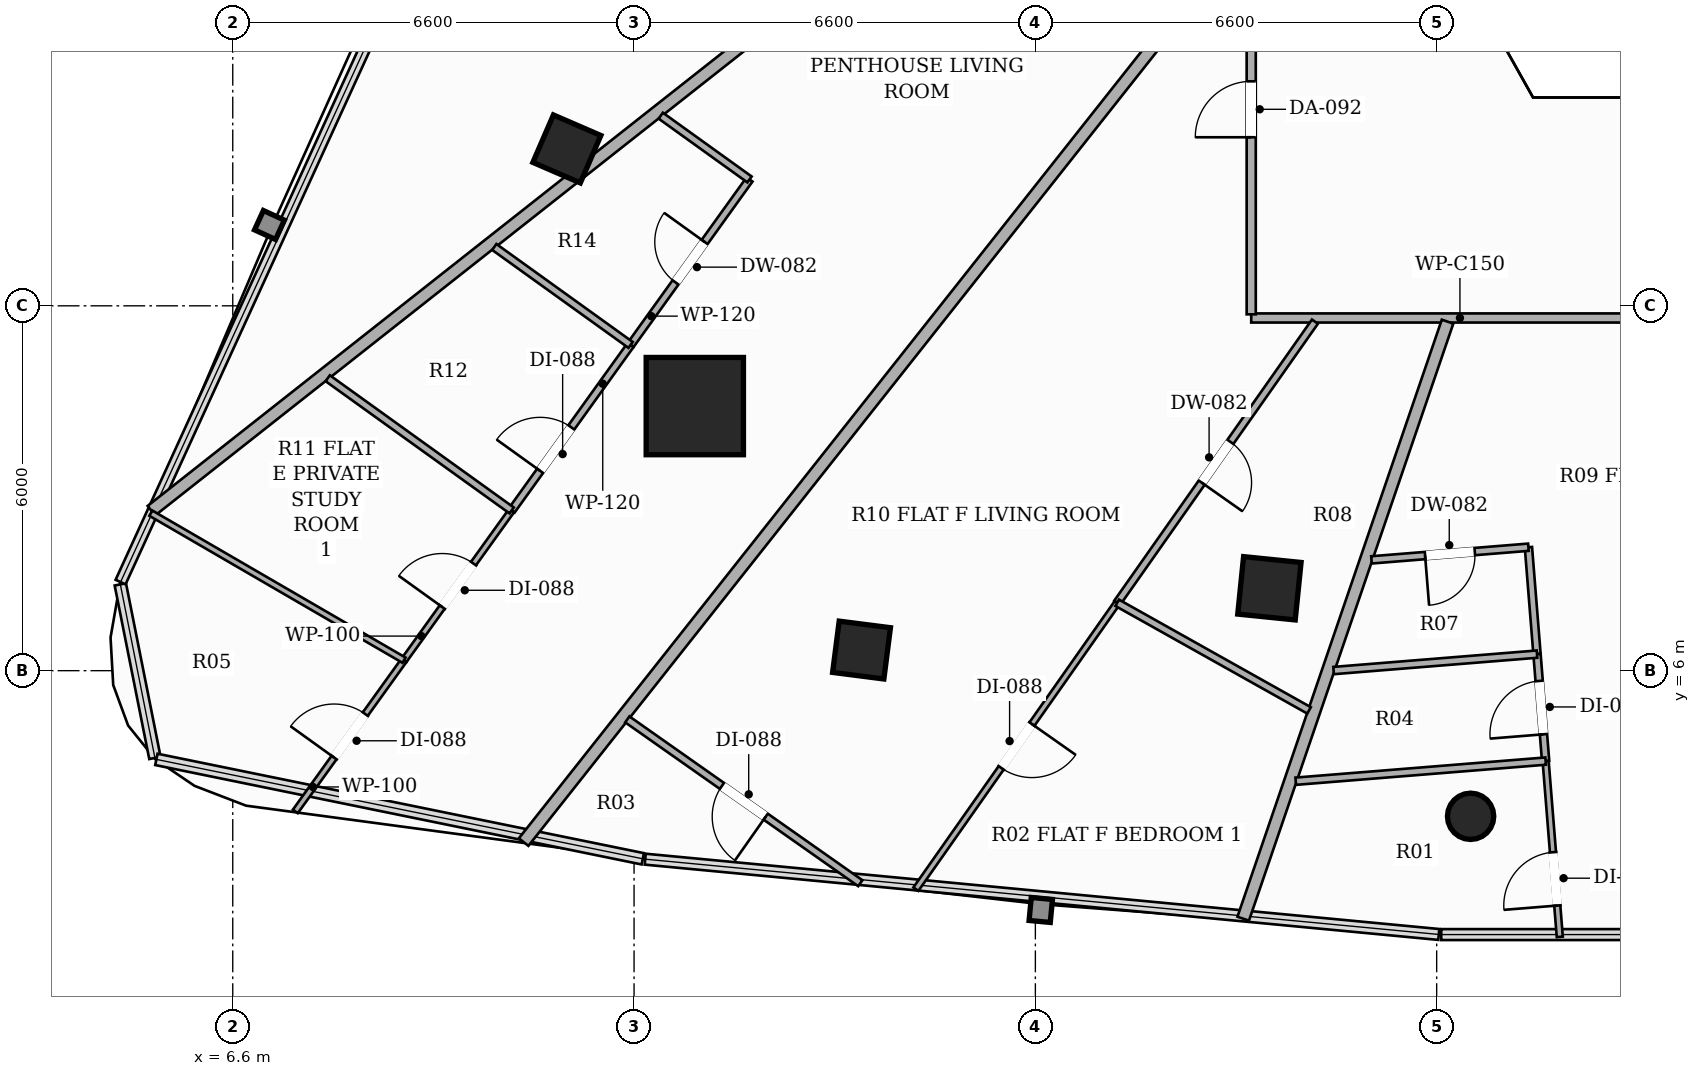
"""IFC4 building model, lengths in metres.
Left out: names, types, materials, properties, quantities, classifications, styles, units other than length and angle.
Written with IfcOpenShell. Run it as: python <this file> out.ifc"""

import sys

from ifc_helpers import new_model, si_unit, direction, frame, frame_2d, origin, origin_2d, place, context, subcontext, project, spatial, rectangle, hollow_rectangle, hollow_circle, extrude, element, fill, save


model = new_model("IFC4")
c1 = context("Model", 3, precision=1e-05, world=origin(), true_north=direction((0.0, 1.0)))
c2 = subcontext(c1, "Body", "Model", "MODEL_VIEW")
j1 = project(units=[si_unit("LENGTHUNIT", "METRE"), si_unit("PLANEANGLEUNIT", "RADIAN")], contexts=[c1])
p1 = place(None, origin())
s1 = spatial("IfcSite", under=j1, at=p1, CompositionType="ELEMENT")
p2 = place(p1, origin())
s2 = spatial("IfcBuilding", under=s1, at=p2, CompositionType="ELEMENT")
p3 = place(p2, frame((0.0, 0.0, 53.3)))
s3 = spatial("IfcBuildingStorey", under=s2, at=p3, CompositionType="ELEMENT", Elevation=53.3)
p4 = place(p3, frame((14.199, 10.351, 0.0), z_axis=(0.0, 0.0, 1.0), x_axis=(1.0, 0.0, 0.0)))
e1 = element("IfcColumn", 1, at=p4, inside=s3, PredefinedType="COLUMN", context=c2, shape_type="SweptSolid", body=[
    extrude(hollow_rectangle(XDim=1.6, YDim=1.6, WallThickness=0.05, at=origin_2d()), origin(), (0.0, 0.0, 1.0), 3.3),
])
p5 = place(p3, frame((23.649, 7.355, 0.0), z_axis=(0.0, 0.0, 1.0), x_axis=(-0.994880708829, 0.101056297183, 0.0)))
e2 = element("IfcColumn", 2, at=p5, inside=s3, PredefinedType="COLUMN", context=c2, shape_type="SweptSolid", body=[
    extrude(hollow_rectangle(XDim=0.95, YDim=0.95, WallThickness=0.032, at=origin_2d()), origin(), (0.0, 0.0, 1.0), 3.3),
])
for number, where, z_axis, x_axis in (
    (3, (12.095, 14.58, 0.0), (0.0, 0.0, 1.0), (0.397, 0.918, 0.0)),
    (4, (16.941, 6.339, 0.0), (0.0, 0.0, 1.0), (-0.992, 0.127, 0.0)),
):
    element("IfcColumn", number, at=place(p3, frame(where, z_axis=z_axis, x_axis=x_axis)), inside=s3, PredefinedType="COLUMN", context=c2, shape_type="SweptSolid", body=[
        extrude(hollow_rectangle(XDim=0.85, YDim=0.85, WallThickness=0.028, at=origin_2d()), origin(), (0.0, 0.0, 1.0), 3.3),
    ])
p6 = place(p3, frame((26.958, 3.605, 0.0), z_axis=(0.0, 0.0, 1.0), x_axis=(1.0, 0.0, 0.0)))
e5 = element("IfcColumn", 5, at=p6, inside=s3, PredefinedType="COLUMN", context=c2, shape_type="SweptSolid", body=[
    extrude(hollow_circle(Radius=0.381, WallThickness=0.022, at=origin_2d()), origin(), (0.0, 0.0, 1.0), 3.3),
])
p7 = place(p3, frame((42.59, 11.8, 0.0), z_axis=(0.0, 0.0, 1.0), x_axis=(-1.0, 0.0, 0.0)))
e6 = element("IfcWall", 6, at=p7, inside=s3, PredefinedType="PARTITIONING", context=c2, shape_type="SweptSolid", body=[
    extrude(rectangle(XDim=19.24, YDim=0.15, at=frame_2d((9.62, 0.0))), origin(), (0.0, 0.0, 1.0), 2.669),
])
p8 = place(p7, frame((11.355, 0.0, 0.0)))
e7 = element("IfcOpeningElement", 7, at=p8, cuts=e6, PredefinedType="OPENING", context=c2, shape_type="SweptSolid", body=[
    extrude(rectangle(XDim=0.92, YDim=2.15, at=frame_2d((0.46, 1.075))), frame((0.0, 0.085, 0.0), z_axis=(0.0, -1.0, 0.0), x_axis=(1.0, 0.0, 0.0)), (0.0, 0.0, 1.0), 0.17),
])
p9 = place(p7, frame((3.524, 0.0, 0.0)))
e8 = element("IfcOpeningElement", 8, at=p9, cuts=e6, PredefinedType="OPENING", context=c2, shape_type="SweptSolid", body=[
    extrude(rectangle(XDim=0.88, YDim=2.1, at=frame_2d((0.44, 1.05))), frame((0.0, 0.085, 0.0), z_axis=(0.0, -1.0, 0.0), x_axis=(1.0, 0.0, 0.0)), (0.0, 0.0, 1.0), 0.17),
])
p10 = place(p3, frame((23.35, 11.86, 0.0), z_axis=(0.0, 0.0, 1.0), x_axis=(0.0, 1.0, 0.0)))
e9 = element("IfcWall", 9, at=p10, inside=s3, PredefinedType="PARTITIONING", context=c2, shape_type="SweptSolid", body=[
    extrude(rectangle(XDim=25.04, YDim=0.15, at=frame_2d((12.52, 0.0))), origin(), (0.0, 0.0, 1.0), 2.413),
])
p11 = place(p10, frame((15.434, 0.0, 0.0)))
e10 = element("IfcOpeningElement", 10, at=p11, cuts=e9, PredefinedType="OPENING", context=c2, shape_type="SweptSolid", body=[
    extrude(rectangle(XDim=0.88, YDim=2.1, at=frame_2d((0.44, 1.05))), frame((0.0, 0.085, 0.0), z_axis=(0.0, -1.0, 0.0), x_axis=(1.0, 0.0, 0.0)), (0.0, 0.0, 1.0), 0.17),
])
p12 = place(p10, frame((22.315, 0.0, 0.0)))
e11 = element("IfcOpeningElement", 11, at=p12, cuts=e9, PredefinedType="OPENING", context=c2, shape_type="SweptSolid", body=[
    extrude(rectangle(XDim=0.88, YDim=2.1, at=frame_2d((0.44, 1.05))), frame((0.0, 0.085, 0.0), z_axis=(0.0, -1.0, 0.0), x_axis=(1.0, 0.0, 0.0)), (0.0, 0.0, 1.0), 0.17),
])
p13 = place(p10, frame((8.21, 0.0, 0.0)))
e12 = element("IfcOpeningElement", 12, at=p13, cuts=e9, PredefinedType="OPENING", context=c2, shape_type="SweptSolid", body=[
    extrude(rectangle(XDim=0.92, YDim=2.15, at=frame_2d((0.46, 1.075))), frame((0.0, 0.085, 0.0), z_axis=(0.0, -1.0, 0.0), x_axis=(1.0, 0.0, 0.0)), (0.0, 0.0, 1.0), 0.17),
])
p14 = place(p10, frame((2.912, 0.0, 0.0)))
e13 = element("IfcOpeningElement", 13, at=p14, cuts=e9, PredefinedType="OPENING", context=c2, shape_type="SweptSolid", body=[
    extrude(rectangle(XDim=0.92, YDim=2.15, at=frame_2d((0.46, 1.075))), frame((0.0, 0.085, 0.0), z_axis=(0.0, -1.0, 0.0), x_axis=(1.0, 0.0, 0.0)), (0.0, 0.0, 1.0), 0.17),
])
p15 = place(p3, frame((23.29, 22.844, 0.0), z_axis=(0.0, 0.0, 1.0), x_axis=(-0.785302077685, -0.619112790034, 0.0)))
e14 = element("IfcWall", 14, at=p15, inside=s3, PredefinedType="PARTITIONING", context=c2, shape_type="SweptSolid", body=[
    extrude(rectangle(XDim=22.957, YDim=0.2, at=frame_2d((11.479, 0.0))), origin(), (0.0, 0.0, 1.0), 2.413),
])
p16 = place(p3, frame((23.29, 18.228, 0.0), z_axis=(0.0, 0.0, 1.0), x_axis=(-0.620501189922, -0.784205504511, 0.0)))
e15 = element("IfcWall", 15, at=p16, inside=s3, PredefinedType="PARTITIONING", context=c2, shape_type="SweptSolid", body=[
    extrude(rectangle(XDim=19.188, YDim=0.2, at=frame_2d((9.594, 0.0))), origin(), (0.0, 0.0, 1.0), 2.413),
])
p17 = place(p3, frame((26.579, 11.74, 0.0), z_axis=(0.0, 0.0, 1.0), x_axis=(-0.32385337678, -0.946107282684, 0.0)))
e16 = element("IfcWall", 16, at=p17, inside=s3, PredefinedType="PARTITIONING", context=c2, shape_type="SweptSolid", body=[
    extrude(rectangle(XDim=10.378, YDim=0.2, at=frame_2d((5.189, 0.0))), origin(), (0.0, 0.0, 1.0), 2.413),
])
p18 = place(p3, frame((13.143, 11.357, 0.0), z_axis=(0.0, 0.0, 1.0), x_axis=(0.583709603858, 0.811962498127, 0.0)))
e17 = element("IfcWall", 17, at=p18, inside=s3, PredefinedType="PARTITIONING", context=c2, shape_type="SweptSolid", body=[
    extrude(rectangle(XDim=3.351, YDim=0.12, at=frame_2d((1.676, 0.0))), origin(), (0.0, 0.0, 1.0), 2.413),
])
p19 = place(p18, frame((1.266, 0.0, 0.0)))
e18 = element("IfcOpeningElement", 18, at=p19, cuts=e17, PredefinedType="OPENING", context=c2, shape_type="SweptSolid", body=[
    extrude(rectangle(XDim=0.82, YDim=2.1, at=frame_2d((0.41, 1.05))), frame((0.0, 0.07, 0.0), z_axis=(0.0, -1.0, 0.0), x_axis=(1.0, 0.0, 0.0)), (0.0, 0.0, 1.0), 0.14),
])
p20 = place(p3, frame((15.099, 14.078, 0.0), z_axis=(0.0, 0.0, 1.0), x_axis=(-0.812134003072, 0.583470959906, 0.0)))
e19 = element("IfcWall", 19, at=p20, inside=s3, PredefinedType="PARTITIONING", context=c2, shape_type="SweptSolid", body=[
    extrude(rectangle(XDim=1.798, YDim=0.12, at=frame_2d((0.899, 0.0))), origin(), (0.0, 0.0, 1.0), 3.06),
])
p21 = place(p3, frame((11.187, 8.635, 0.0), z_axis=(0.0, 0.0, 1.0), x_axis=(0.583571510595, 0.812061753823, 0.0)))
e20 = element("IfcWall", 20, at=p21, inside=s3, PredefinedType="PARTITIONING", context=c2, shape_type="SweptSolid", body=[
    extrude(rectangle(XDim=3.352, YDim=0.12, at=frame_2d((1.676, 0.0))), origin(), (0.0, 0.0, 1.0), 2.619),
])
p22 = place(p21, frame((0.802, 0.0, 0.0)))
e21 = element("IfcOpeningElement", 21, at=p22, cuts=e20, PredefinedType="OPENING", context=c2, shape_type="SweptSolid", body=[
    extrude(rectangle(XDim=0.88, YDim=2.1, at=frame_2d((0.44, 1.05))), frame((0.0, 0.07, 0.0), z_axis=(0.0, -1.0, 0.0), x_axis=(1.0, 0.0, 0.0)), (0.0, 0.0, 1.0), 0.14),
])
p23 = place(p3, frame((7.629, 3.685, 0.0), z_axis=(0.0, 0.0, 1.0), x_axis=(0.583746077317, 0.811936276574, 0.0)))
e22 = element("IfcWall", 22, at=p23, inside=s3, PredefinedType="PARTITIONING", context=c2, shape_type="SweptSolid", body=[
    extrude(rectangle(XDim=3.063, YDim=0.1, at=frame_2d((1.532, 0.0))), origin(), (0.0, 0.0, 1.0), 3.06),
])
p24 = place(p23, frame((1.092, 0.0, 0.0)))
e23 = element("IfcOpeningElement", 23, at=p24, cuts=e22, PredefinedType="OPENING", context=c2, shape_type="SweptSolid", body=[
    extrude(rectangle(XDim=0.88, YDim=2.1, at=frame_2d((0.44, 1.05))), frame((0.0, 0.06, 0.0), z_axis=(0.0, -1.0, 0.0), x_axis=(1.0, 0.0, 0.0)), (0.0, 0.0, 1.0), 0.12),
])
p25 = place(p3, frame((9.417, 6.172, 0.0), z_axis=(0.0, 0.0, 1.0), x_axis=(0.583596240012, 0.812043981964, 0.0)))
e24 = element("IfcWall", 24, at=p25, inside=s3, PredefinedType="PARTITIONING", context=c2, shape_type="SweptSolid", body=[
    extrude(rectangle(XDim=3.033, YDim=0.1, at=frame_2d((1.517, 0.0))), origin(), (0.0, 0.0, 1.0), 2.619),
])
p26 = place(p25, frame((1.077, 0.0, 0.0)))
e25 = element("IfcOpeningElement", 25, at=p26, cuts=e24, PredefinedType="OPENING", context=c2, shape_type="SweptSolid", body=[
    extrude(rectangle(XDim=0.88, YDim=2.1, at=frame_2d((0.44, 1.05))), frame((0.0, 0.06, 0.0), z_axis=(0.0, -1.0, 0.0), x_axis=(1.0, 0.0, 0.0)), (0.0, 0.0, 1.0), 0.12),
])
p27 = place(p3, frame((13.143, 11.357, 0.0), z_axis=(0.0, 0.0, 1.0), x_axis=(-0.812099176387, 0.583519432162, 0.0)))
e26 = element("IfcWall", 26, at=p27, inside=s3, PredefinedType="PARTITIONING", context=c2, shape_type="SweptSolid", body=[
    extrude(rectangle(XDim=2.761, YDim=0.12, at=frame_2d((1.38, 0.0))), origin(), (0.0, 0.0, 1.0), 3.06),
])
p28 = place(p3, frame((11.187, 8.635, 0.0), z_axis=(0.0, 0.0, 1.0), x_axis=(-0.812025077548, 0.583622543629, 0.0)))
e27 = element("IfcWall", 27, at=p28, inside=s3, PredefinedType="PARTITIONING", context=c2, shape_type="SweptSolid", body=[
    extrude(rectangle(XDim=3.725, YDim=0.12, at=frame_2d((1.863, 0.0))), origin(), (0.0, 0.0, 1.0), 2.619),
])
p29 = place(p3, frame((5.253, 8.59, 0.0), z_axis=(0.0, 0.0, 1.0), x_axis=(0.864777582771, -0.502155087932, 0.0)))
e28 = element("IfcWall", 28, at=p29, inside=s3, PredefinedType="PARTITIONING", context=c2, shape_type="SweptSolid", body=[
    extrude(rectangle(XDim=4.815, YDim=0.1, at=frame_2d((2.408, 0.0))), origin(), (0.0, 0.0, 1.0), 3.06),
])
p30 = place(p3, frame((24.398, 11.74, 0.0), z_axis=(0.0, 0.0, 1.0), x_axis=(-0.575258030062, -0.817972003707, 0.0)))
e29 = element("IfcWall", 29, at=p30, inside=s3, PredefinedType="PARTITIONING", context=c2, shape_type="SweptSolid", body=[
    extrude(rectangle(XDim=5.653, YDim=0.12, at=frame_2d((2.827, 0.0))), origin(), (0.0, 0.0, 1.0), 2.413),
])
p31 = place(p30, frame((2.417, 0.0, 0.0)))
e30 = element("IfcOpeningElement", 30, at=p31, cuts=e29, PredefinedType="OPENING", context=c2, shape_type="SweptSolid", body=[
    extrude(rectangle(XDim=0.82, YDim=2.1, at=frame_2d((0.41, 1.05))), frame((0.0, 0.07, 0.0), z_axis=(0.0, -1.0, 0.0), x_axis=(1.0, 0.0, 0.0)), (0.0, 0.0, 1.0), 0.14),
])
p32 = place(p3, frame((16.921, 2.505, 0.0), z_axis=(0.0, 0.0, 1.0), x_axis=(-0.818042569522, 0.575157677902, 0.0)))
e31 = element("IfcWall", 31, at=p32, inside=s3, PredefinedType="PARTITIONING", context=c2, shape_type="SweptSolid", body=[
    extrude(rectangle(XDim=4.684, YDim=0.12, at=frame_2d((2.342, 0.0))), origin(), (0.0, 0.0, 1.0), 2.619),
])
p33 = place(p32, frame((1.902, 0.0, 0.0)))
e32 = element("IfcOpeningElement", 32, at=p33, cuts=e31, PredefinedType="OPENING", context=c2, shape_type="SweptSolid", body=[
    extrude(rectangle(XDim=0.88, YDim=2.1, at=frame_2d((0.44, 1.05))), frame((0.0, 0.07, 0.0), z_axis=(0.0, -1.0, 0.0), x_axis=(1.0, 0.0, 0.0)), (0.0, 0.0, 1.0), 0.14),
])
p34 = place(p3, frame((21.146, 7.116, 0.0), z_axis=(0.0, 0.0, 1.0), x_axis=(-0.575180299529, -0.818026664011, 0.0)))
e33 = element("IfcWall", 33, at=p34, inside=s3, PredefinedType="PARTITIONING", context=c2, shape_type="SweptSolid", body=[
    extrude(rectangle(XDim=5.757, YDim=0.1, at=frame_2d((2.878, 0.0))), origin(), (0.0, 0.0, 1.0), 2.413),
])
p35 = place(p34, frame((2.438, 0.0, 0.0)))
e34 = element("IfcOpeningElement", 34, at=p35, cuts=e33, PredefinedType="OPENING", context=c2, shape_type="SweptSolid", body=[
    extrude(rectangle(XDim=0.88, YDim=2.1, at=frame_2d((0.44, 1.05))), frame((0.0, 0.06, 0.0), z_axis=(0.0, -1.0, 0.0), x_axis=(1.0, 0.0, 0.0)), (0.0, 0.0, 1.0), 0.12),
])
p36 = place(p3, frame((24.301, 5.347, 0.0), z_axis=(0.0, 0.0, 1.0), x_axis=(-0.872243471816, 0.48907190256, 0.0)))
e35 = element("IfcWall", 35, at=p36, inside=s3, PredefinedType="PARTITIONING", context=c2, shape_type="SweptSolid", body=[
    extrude(rectangle(XDim=3.617, YDim=0.12, at=frame_2d((1.809, 0.0))), origin(), (0.0, 0.0, 1.0), 2.413),
])
p37 = place(p3, frame((28.05, 6.272, 0.0), z_axis=(0.0, 0.0, 1.0), x_axis=(-0.080009304194, 0.996794116778, 0.0)))
e36 = element("IfcWall", 36, at=p37, inside=s3, PredefinedType="PARTITIONING", context=c2, shape_type="SweptSolid", body=[
    extrude(rectangle(XDim=1.764, YDim=0.12, at=frame_2d((0.882, 0.0))), origin(), (0.0, 0.0, 1.0), 3.06),
])
p38 = place(p3, frame((27.909, 8.03, 0.0), z_axis=(0.0, 0.0, 1.0), x_axis=(-0.996768339954, -0.080329798112, 0.0)))
e37 = element("IfcWall", 37, at=p38, inside=s3, PredefinedType="PARTITIONING", context=c2, shape_type="SweptSolid", body=[
    extrude(rectangle(XDim=2.589, YDim=0.12, at=frame_2d((1.295, 0.0))), origin(), (0.0, 0.0, 1.0), 3.06),
])
p39 = place(p38, frame((0.885, 0.0, 0.0)))
e38 = element("IfcOpeningElement", 38, at=p39, cuts=e37, PredefinedType="OPENING", context=c2, shape_type="SweptSolid", body=[
    extrude(rectangle(XDim=0.82, YDim=2.1, at=frame_2d((0.41, 1.05))), frame((0.0, 0.07, 0.0), z_axis=(0.0, -1.0, 0.0), x_axis=(1.0, 0.0, 0.0)), (0.0, 0.0, 1.0), 0.14),
])
p40 = place(p3, frame((28.192, 4.513, 0.0), z_axis=(0.0, 0.0, 1.0), x_axis=(-0.080377539135, 0.996764491343, 0.0)))
e39 = element("IfcWall", 39, at=p40, inside=s3, PredefinedType="PARTITIONING", context=c2, shape_type="SweptSolid", body=[
    extrude(rectangle(XDim=1.765, YDim=0.12, at=frame_2d((0.882, 0.0))), origin(), (0.0, 0.0, 1.0), 2.413),
])
p41 = place(p40, frame((0.442, 0.0, 0.0)))
e40 = element("IfcOpeningElement", 40, at=p41, cuts=e39, PredefinedType="OPENING", context=c2, shape_type="SweptSolid", body=[
    extrude(rectangle(XDim=0.88, YDim=2.1, at=frame_2d((0.44, 1.05))), frame((0.0, 0.07, 0.0), z_axis=(0.0, -1.0, 0.0), x_axis=(1.0, 0.0, 0.0)), (0.0, 0.0, 1.0), 0.14),
])
p42 = place(p3, frame((28.425, 1.622, 0.0), z_axis=(0.0, 0.0, 1.0), x_axis=(-0.080390934681, 0.996763411057, 0.0)))
e41 = element("IfcWall", 41, at=p42, inside=s3, PredefinedType="PARTITIONING", context=c2, shape_type="SweptSolid", body=[
    extrude(rectangle(XDim=2.9, YDim=0.1, at=frame_2d((1.45, 0.0))), origin(), (0.0, 0.0, 1.0), 2.413),
])
p43 = place(p42, frame((0.517, 0.0, 0.0)))
e42 = element("IfcOpeningElement", 42, at=p43, cuts=e41, PredefinedType="OPENING", context=c2, shape_type="SweptSolid", body=[
    extrude(rectangle(XDim=0.88, YDim=2.1, at=frame_2d((0.44, 1.05))), frame((0.0, 0.06, 0.0), z_axis=(0.0, -1.0, 0.0), x_axis=(1.0, 0.0, 0.0)), (0.0, 0.0, 1.0), 0.12),
])
p44 = place(p3, frame((28.05, 6.272, 0.0), z_axis=(0.0, 0.0, 1.0), x_axis=(-0.99675765278, -0.080462299392, 0.0)))
e43 = element("IfcWall", 43, at=p44, inside=s3, PredefinedType="PARTITIONING", context=c2, shape_type="SweptSolid", body=[
    extrude(rectangle(XDim=3.356, YDim=0.12, at=frame_2d((1.678, 0.0))), origin(), (0.0, 0.0, 1.0), 2.413),
])
p45 = place(p3, frame((28.192, 4.513, 0.0), z_axis=(0.0, 0.0, 1.0), x_axis=(-0.996771449714, -0.080291201486, 0.0)))
e44 = element("IfcWall", 44, at=p45, inside=s3, PredefinedType="PARTITIONING", context=c2, shape_type="SweptSolid", body=[
    extrude(rectangle(XDim=4.123, YDim=0.12, at=frame_2d((2.062, 0.0))), origin(), (0.0, 0.0, 1.0), 2.413),
])
p46 = place(p19, origin())
e45 = element("IfcDoor", 45, at=p46, inside=s3, OperationType="SINGLE_SWING_RIGHT", PredefinedType="DOOR", context=c2, shape_type="SweptSolid", body=[
    extrude(rectangle(XDim=0.82, YDim=2.1, at=frame_2d((0.41, 1.05))), frame((0.0, 0.025, 0.0), z_axis=(0.0, -1.0, 0.0), x_axis=(1.0, 0.0, 0.0)), (0.0, 0.0, 1.0), 0.05),
])
fill(e18, e45)
p47 = place(p22, origin())
e46 = element("IfcDoor", 46, at=p47, inside=s3, OperationType="SINGLE_SWING_LEFT", PredefinedType="DOOR", context=c2, shape_type="SweptSolid", body=[
    extrude(rectangle(XDim=0.88, YDim=2.1, at=frame_2d((0.44, 1.05))), frame((0.0, 0.025, 0.0), z_axis=(0.0, -1.0, 0.0), x_axis=(1.0, 0.0, 0.0)), (0.0, 0.0, 1.0), 0.05),
])
fill(e21, e46)
p48 = place(p24, origin())
e47 = element("IfcDoor", 47, at=p48, inside=s3, OperationType="SINGLE_SWING_LEFT", PredefinedType="DOOR", context=c2, shape_type="SweptSolid", body=[
    extrude(rectangle(XDim=0.88, YDim=2.1, at=frame_2d((0.44, 1.05))), frame((0.0, 0.025, 0.0), z_axis=(0.0, -1.0, 0.0), x_axis=(1.0, 0.0, 0.0)), (0.0, 0.0, 1.0), 0.05),
])
fill(e23, e47)
p49 = place(p26, origin())
e48 = element("IfcDoor", 48, at=p49, inside=s3, OperationType="SINGLE_SWING_LEFT", PredefinedType="DOOR", context=c2, shape_type="SweptSolid", body=[
    extrude(rectangle(XDim=0.88, YDim=2.1, at=frame_2d((0.44, 1.05))), frame((0.0, 0.025, 0.0), z_axis=(0.0, -1.0, 0.0), x_axis=(1.0, 0.0, 0.0)), (0.0, 0.0, 1.0), 0.05),
])
fill(e25, e48)
p50 = place(p14, origin())
e49 = element("IfcDoor", 49, at=p50, inside=s3, OperationType="SINGLE_SWING_LEFT", PredefinedType="DOOR", context=c2, shape_type="SweptSolid", body=[
    extrude(rectangle(XDim=0.92, YDim=2.15, at=frame_2d((0.46, 1.075))), frame((0.0, 0.025, 0.0), z_axis=(0.0, -1.0, 0.0), x_axis=(1.0, 0.0, 0.0)), (0.0, 0.0, 1.0), 0.05),
])
fill(e13, e49)
p51 = place(p31, origin())
e50 = element("IfcDoor", 50, at=p51, inside=s3, OperationType="SINGLE_SWING_RIGHT", PredefinedType="DOOR", context=c2, shape_type="SweptSolid", body=[
    extrude(rectangle(XDim=0.82, YDim=2.1, at=frame_2d((0.41, 1.05))), frame((0.0, 0.025, 0.0), z_axis=(0.0, -1.0, 0.0), x_axis=(1.0, 0.0, 0.0)), (0.0, 0.0, 1.0), 0.05),
])
fill(e30, e50)
p52 = place(p33, origin())
e51 = element("IfcDoor", 51, at=p52, inside=s3, OperationType="SINGLE_SWING_LEFT", PredefinedType="DOOR", context=c2, shape_type="SweptSolid", body=[
    extrude(rectangle(XDim=0.88, YDim=2.1, at=frame_2d((0.44, 1.05))), frame((0.0, 0.025, 0.0), z_axis=(0.0, -1.0, 0.0), x_axis=(1.0, 0.0, 0.0)), (0.0, 0.0, 1.0), 0.05),
])
fill(e32, e51)
p53 = place(p35, origin())
e52 = element("IfcDoor", 52, at=p53, inside=s3, OperationType="SINGLE_SWING_LEFT", PredefinedType="DOOR", context=c2, shape_type="SweptSolid", body=[
    extrude(rectangle(XDim=0.88, YDim=2.1, at=frame_2d((0.44, 1.05))), frame((0.0, 0.025, 0.0), z_axis=(0.0, -1.0, 0.0), x_axis=(1.0, 0.0, 0.0)), (0.0, 0.0, 1.0), 0.05),
])
fill(e34, e52)
p54 = place(p39, origin())
e53 = element("IfcDoor", 53, at=p54, inside=s3, OperationType="SINGLE_SWING_RIGHT", PredefinedType="DOOR", context=c2, shape_type="SweptSolid", body=[
    extrude(rectangle(XDim=0.82, YDim=2.1, at=frame_2d((0.41, 1.05))), frame((0.0, 0.025, 0.0), z_axis=(0.0, -1.0, 0.0), x_axis=(1.0, 0.0, 0.0)), (0.0, 0.0, 1.0), 0.05),
])
fill(e38, e53)
p55 = place(p41, origin())
e54 = element("IfcDoor", 54, at=p55, inside=s3, OperationType="SINGLE_SWING_LEFT", PredefinedType="DOOR", context=c2, shape_type="SweptSolid", body=[
    extrude(rectangle(XDim=0.88, YDim=2.1, at=frame_2d((0.44, 1.05))), frame((0.0, 0.025, 0.0), z_axis=(0.0, -1.0, 0.0), x_axis=(1.0, 0.0, 0.0)), (0.0, 0.0, 1.0), 0.05),
])
fill(e40, e54)
p56 = place(p43, origin())
e55 = element("IfcDoor", 55, at=p56, inside=s3, OperationType="SINGLE_SWING_LEFT", PredefinedType="DOOR", context=c2, shape_type="SweptSolid", body=[
    extrude(rectangle(XDim=0.88, YDim=2.1, at=frame_2d((0.44, 1.05))), frame((0.0, 0.025, 0.0), z_axis=(0.0, -1.0, 0.0), x_axis=(1.0, 0.0, 0.0)), (0.0, 0.0, 1.0), 0.05),
])
fill(e42, e55)
save(model, sys.argv[1])
